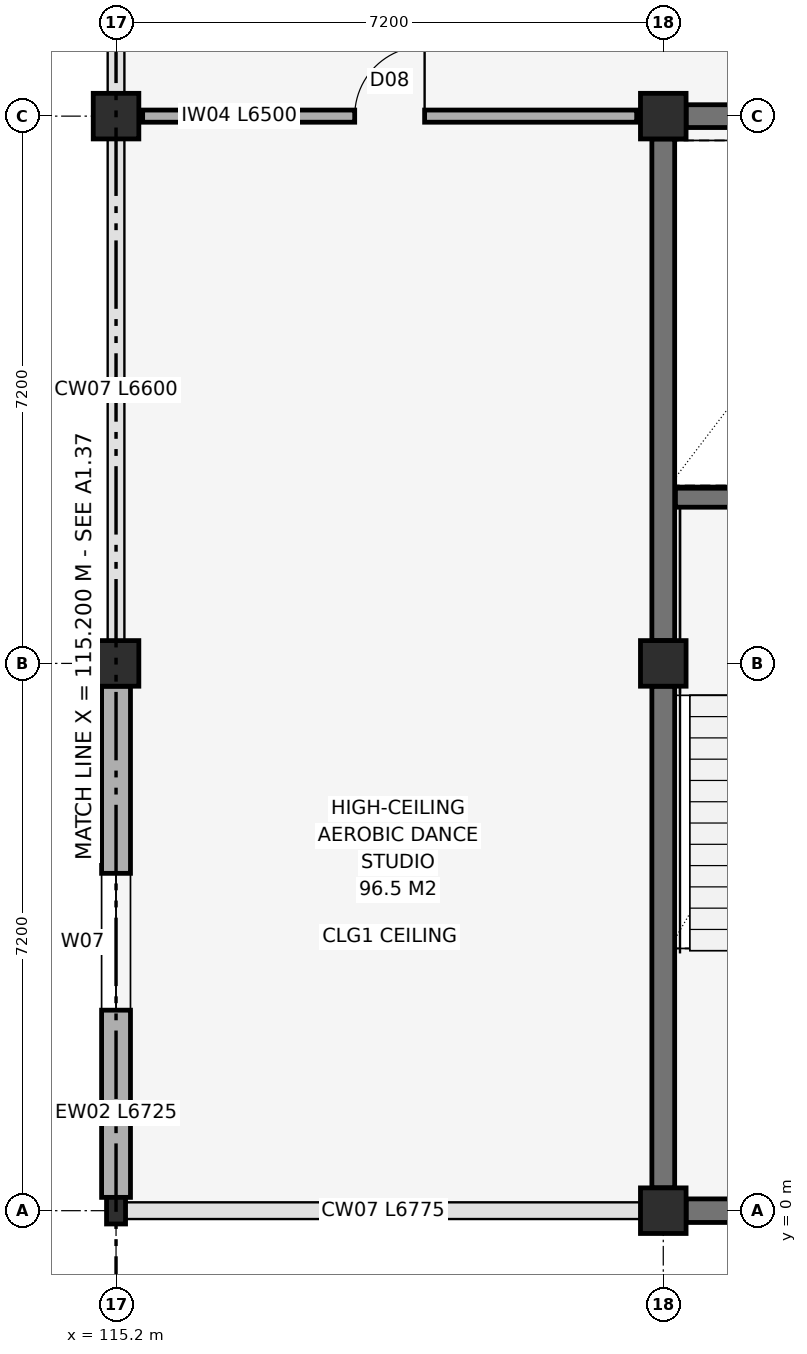
"""IFC4 building model, lengths in metres.
Left out: names, types, materials, properties, quantities, classifications, styles, units other than length and angle.
Written with IfcOpenShell. Run it as: python <this file> out.ifc"""

import sys

from ifc_helpers import new_model, si_unit, direction, frame, frame_2d, origin, origin_2d, place, context, subcontext, project, spatial, rectangle, hollow_rectangle, extrude, element, fill, save


model = new_model("IFC4")
c1 = context("Model", 3, precision=1e-05, world=origin(), true_north=direction((0.0, 1.0)))
c2 = subcontext(c1, "Body", "Model", "MODEL_VIEW")
j1 = project(units=[si_unit("LENGTHUNIT", "METRE"), si_unit("PLANEANGLEUNIT", "RADIAN")], contexts=[c1])
p1 = place(None, origin())
s1 = spatial("IfcSite", under=j1, at=p1, CompositionType="ELEMENT")
p2 = place(p1, origin())
s2 = spatial("IfcBuilding", under=s1, at=p2, CompositionType="ELEMENT")
p3 = place(p2, frame((0.0, 0.0, 15.0)))
s3 = spatial("IfcBuildingStorey", under=s2, at=p3, CompositionType="ELEMENT", Elevation=15.0)
p4 = place(p3, frame((115.2, 0.0, 0.0), z_axis=(0.0, 0.0, 1.0), x_axis=(1.0, 0.0, 0.0)))
e1 = element("IfcColumn", 1, at=p4, inside=s3, PredefinedType="COLUMN", context=c2, shape_type="SweptSolid", body=[
    extrude(hollow_rectangle(XDim=0.25, YDim=0.35, WallThickness=0.012, at=origin_2d()), origin(), (0.0, 0.0, 1.0), 4.2),
])
for number, where, z_axis, x_axis in (
    (2, (115.2, 7.2, 0.0), (0.0, 0.0, 1.0), (1.0, 0.0, 0.0)),
    (3, (115.2, 14.4, 0.0), (0.0, 0.0, 1.0), (1.0, 0.0, 0.0)),
    (4, (122.4, 0.0, 0.0), (0.0, 0.0, 1.0), (1.0, 0.0, 0.0)),
    (5, (122.4, 7.2, 0.0), (0.0, 0.0, 1.0), (1.0, 0.0, 0.0)),
    (6, (122.4, 14.4, 0.0), (0.0, 0.0, 1.0), (1.0, 0.0, 0.0)),
):
    element("IfcColumn", number, at=place(p3, frame(where, z_axis=z_axis, x_axis=x_axis)), inside=s3, PredefinedType="COLUMN", context=c2, shape_type="SweptSolid", body=[
        extrude(rectangle(XDim=0.6, YDim=0.6, at=origin_2d()), origin(), (0.0, 0.0, 1.0), 4.2),
    ])
p5 = place(p3, frame((115.2, 0.175, 0.0), z_axis=(0.0, 0.0, 1.0), x_axis=(0.0, 1.0, 0.0)))
e7 = element("IfcWall", 7, at=p5, inside=s3, PredefinedType="SOLIDWALL", context=c2, shape_type="SweptSolid", body=[
    extrude(rectangle(XDim=6.725, YDim=0.38, at=frame_2d((3.362, 0.0))), origin(), (0.0, 0.0, 1.0), 3.57),
])
p6 = place(p5, frame((2.463, 0.0, 0.95)))
e8 = element("IfcOpeningElement", 8, at=p6, cuts=e7, PredefinedType="OPENING", context=c2, shape_type="SweptSolid", body=[
    extrude(rectangle(XDim=1.8, YDim=2.0, at=frame_2d((0.9, 1.0))), frame((0.0, 0.205, 0.0), z_axis=(0.0, -1.0, 0.0), x_axis=(1.0, 0.0, 0.0)), (0.0, 0.0, 1.0), 0.41),
])
p7 = place(p3, frame((122.7, 0.0, 0.0), z_axis=(0.0, 0.0, 1.0), x_axis=(1.0, 0.0, 0.0)))
e9 = element("IfcWall", 9, at=p7, inside=s3, PredefinedType="SHEAR", context=c2, shape_type="SweptSolid", body=[
    extrude(rectangle(XDim=6.6, YDim=0.31, at=frame_2d((3.3, 0.0))), origin(), (0.0, 0.0, 1.0), 3.96),
])
p8 = place(p3, frame((122.7, 14.4, 0.0), z_axis=(0.0, 0.0, 1.0), x_axis=(1.0, 0.0, 0.0)))
e10 = element("IfcWall", 10, at=p8, inside=s3, PredefinedType="SHEAR", context=c2, shape_type="SweptSolid", body=[
    extrude(rectangle(XDim=6.775, YDim=0.3, at=frame_2d((3.388, 0.0))), origin(), (0.0, 0.0, 1.0), 3.96),
])
p9 = place(p3, frame((122.4, 0.3, 0.0), z_axis=(0.0, 0.0, 1.0), x_axis=(0.0, 1.0, 0.0)))
e11 = element("IfcWall", 11, at=p9, inside=s3, PredefinedType="SHEAR", context=c2, shape_type="SweptSolid", body=[
    extrude(rectangle(XDim=6.6, YDim=0.3, at=frame_2d((3.3, 0.0))), origin(), (0.0, 0.0, 1.0), 3.96),
])
p10 = place(p3, frame((122.4, 7.5, 0.0), z_axis=(0.0, 0.0, 1.0), x_axis=(0.0, 1.0, 0.0)))
e12 = element("IfcWall", 12, at=p10, inside=s3, PredefinedType="SHEAR", context=c2, shape_type="SweptSolid", body=[
    extrude(rectangle(XDim=6.6, YDim=0.3, at=frame_2d((3.3, 0.0))), origin(), (0.0, 0.0, 1.0), 3.96),
])
p11 = place(p3, frame((122.56, 9.38, 0.0), z_axis=(0.0, 0.0, 1.0), x_axis=(1.0, 0.0, 0.0)))
e13 = element("IfcWall", 13, at=p11, inside=s3, PredefinedType="SHEAR", context=c2, shape_type="SweptSolid", body=[
    extrude(rectangle(XDim=3.3, YDim=0.25, at=frame_2d((1.65, 0.0))), origin(), (0.0, 0.0, 1.0), 3.96),
])
p12 = place(p3, frame((115.55, 14.4, 0.0), z_axis=(0.0, 0.0, 1.0), x_axis=(1.0, 0.0, 0.0)))
e14 = element("IfcWall", 14, at=p12, inside=s3, PredefinedType="PARTITIONING", context=c2, shape_type="SweptSolid", body=[
    extrude(rectangle(XDim=6.5, YDim=0.16, at=frame_2d((3.25, 0.0))), origin(), (0.0, 0.0, 1.0), 3.57),
])
p13 = place(p12, frame((2.79, 0.0, 0.0)))
e15 = element("IfcOpeningElement", 15, at=p13, cuts=e14, PredefinedType="OPENING", context=c2, shape_type="SweptSolid", body=[
    extrude(rectangle(XDim=0.92, YDim=2.1, at=frame_2d((0.46, 1.05))), frame((0.0, 0.095, 0.0), z_axis=(0.0, -1.0, 0.0), x_axis=(1.0, 0.0, 0.0)), (0.0, 0.0, 1.0), 0.19),
])
p14 = place(p6, origin())
e16 = element("IfcWindow", 16, at=p14, inside=s3, PartitioningType="SINGLE_PANEL", PredefinedType="WINDOW", context=c2, shape_type="SweptSolid", body=[
    extrude(rectangle(XDim=1.8, YDim=2.0, at=frame_2d((0.9, 1.0))), frame((0.0, 0.03, 0.0), z_axis=(0.0, -1.0, 0.0), x_axis=(1.0, 0.0, 0.0)), (0.0, 0.0, 1.0), 0.06),
])
fill(e8, e16)
p15 = place(p13, frame((0.92, 0.0, 0.0), z_axis=(0.0, 0.0, 1.0), x_axis=(-1.0, 0.0, 0.0)))
e17 = element("IfcDoor", 17, at=p15, inside=s3, OperationType="SINGLE_SWING_LEFT", PredefinedType="DOOR", context=c2, shape_type="SweptSolid", body=[
    extrude(rectangle(XDim=0.92, YDim=2.1, at=frame_2d((0.46, 1.05))), frame((0.0, 0.025, 0.0), z_axis=(0.0, -1.0, 0.0), x_axis=(1.0, 0.0, 0.0)), (0.0, 0.0, 1.0), 0.05),
])
fill(e15, e17)
save(model, sys.argv[1])
